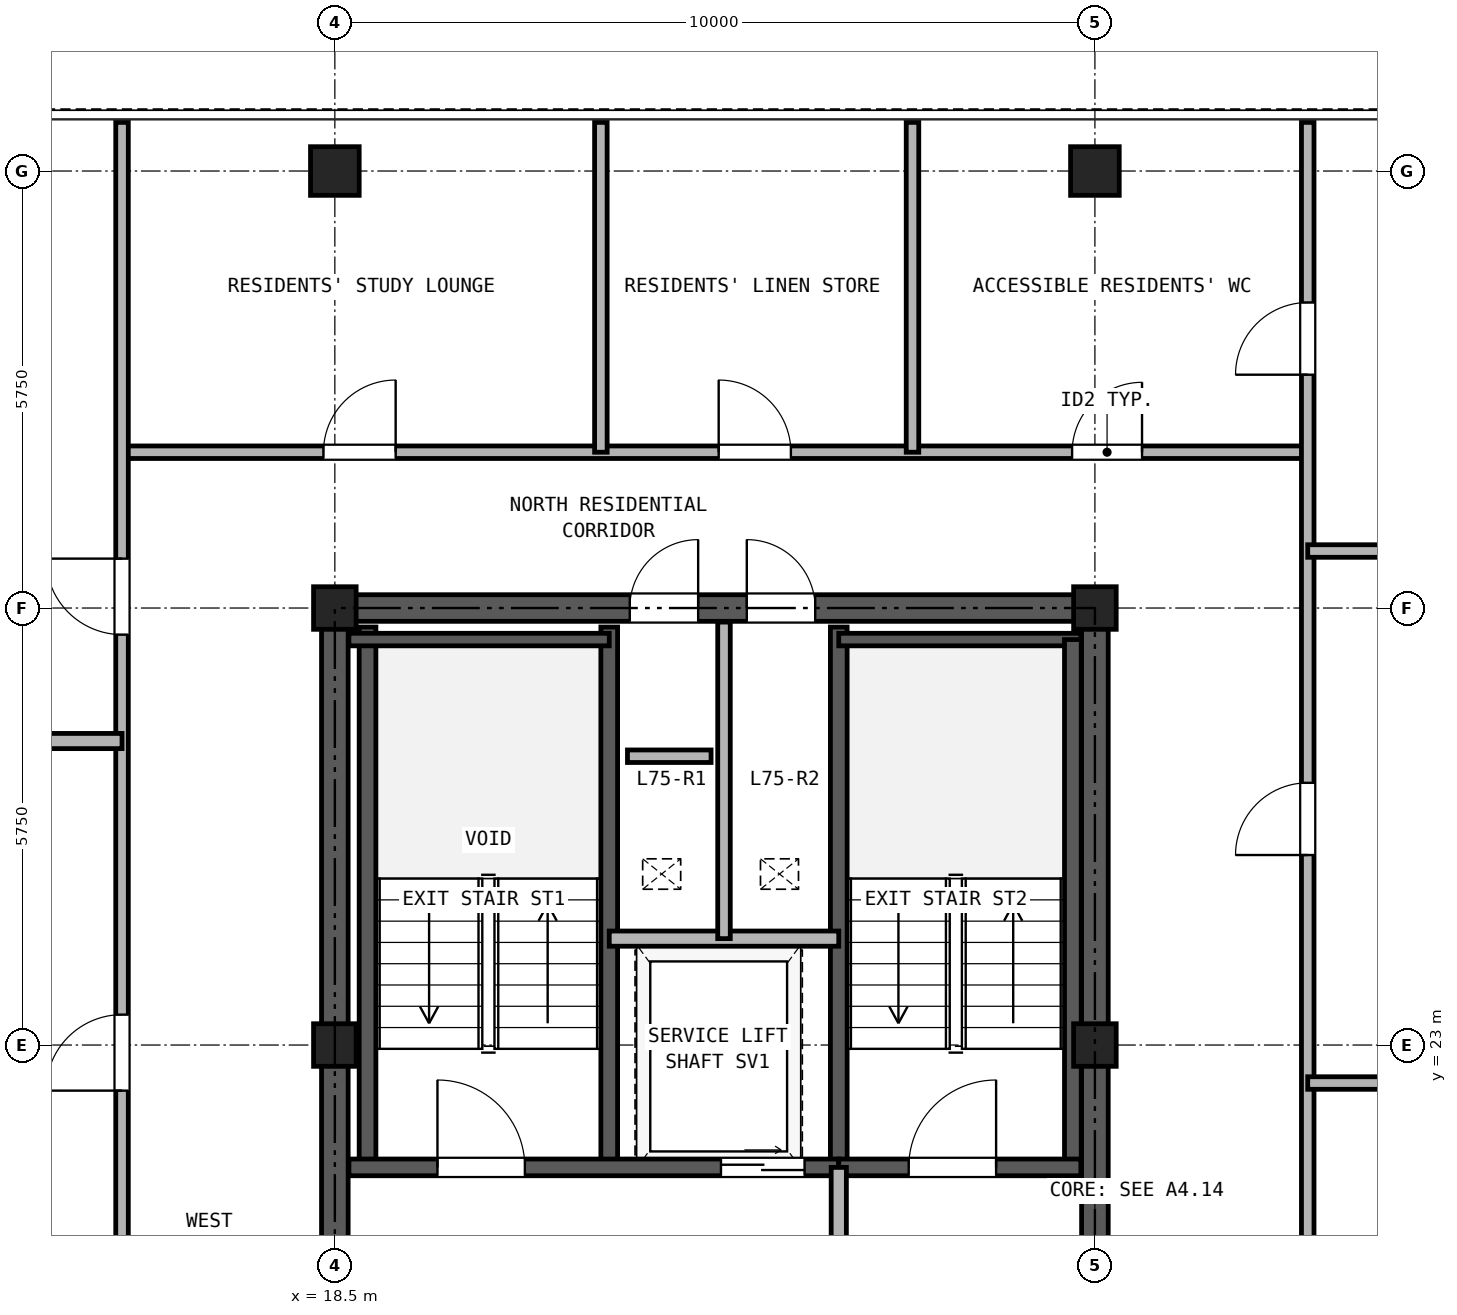
"""IFC4 building model, lengths in metres.
Left out: names, types, materials, properties, quantities, classifications, styles, units other than length and angle.
Written with IfcOpenShell. Run it as: python <this file> out.ifc"""

import sys

from ifc_helpers import new_model, si_unit, direction, frame, frame_2d, origin, origin_2d, place, context, subcontext, project, spatial, rectangle, hollow_rectangle, extrude, source, transform, mapped, element, fill, save


model = new_model("IFC4")
c1 = context("Model", 3, precision=1e-05, world=origin(), true_north=direction((0.0, 1.0)))
c2 = subcontext(c1, "Body", "Model", "MODEL_VIEW")
j1 = project(units=[si_unit("LENGTHUNIT", "METRE"), si_unit("PLANEANGLEUNIT", "RADIAN")], contexts=[c1])
p1 = place(None, origin())
s1 = spatial("IfcSite", under=j1, at=p1, CompositionType="ELEMENT")
p2 = place(p1, origin())
s2 = spatial("IfcBuilding", under=s1, at=p2, CompositionType="ELEMENT")
p3 = place(p2, frame((0.0, 0.0, 261.7)))
s3 = spatial("IfcBuildingStorey", under=s2, at=p3, CompositionType="ELEMENT", Elevation=261.7)
m1 = source(origin(), c2, "Body", "SweptSolid", [
    extrude(hollow_rectangle(XDim=0.64, YDim=0.64, WallThickness=0.035, at=origin_2d()), origin(), (0.0, 0.0, 1.0), 2.98),
])
for number, where, z_axis, x_axis in (
    (1, (18.5, 34.5, 0.0), (0.0, 0.0, 1.0), (1.0, 0.0, 0.0)),
    (2, (28.5, 34.5, 0.0), (0.0, 0.0, 1.0), (1.0, 0.0, 0.0)),
):
    element("IfcColumn", number, at=place(p3, frame(where, z_axis=z_axis, x_axis=x_axis)), inside=s3, PredefinedType="COLUMN", context=c2, shape_type="MappedRepresentation", body=[
        mapped(m1, transform((0.0, 0.0, 0.0), x_axis=(1.0, 0.0, 0.0), y_axis=(0.0, 1.0, 0.0), z_axis=(0.0, 0.0, 1.0), scale=1.0)),
    ])
m2 = source(origin(), c2, "Body", "SweptSolid", [
    extrude(hollow_rectangle(XDim=0.56, YDim=0.56, WallThickness=0.03, at=origin_2d()), origin(), (0.0, 0.0, 1.0), 2.98),
])
for number, where, z_axis, x_axis in (
    (3, (18.5, 23.0, 0.0), (0.0, 0.0, 1.0), (1.0, 0.0, 0.0)),
    (4, (18.5, 28.75, 0.0), (0.0, 0.0, 1.0), (1.0, 0.0, 0.0)),
    (5, (28.5, 23.0, 0.0), (0.0, 0.0, 1.0), (1.0, 0.0, 0.0)),
    (6, (28.5, 28.75, 0.0), (0.0, 0.0, 1.0), (1.0, 0.0, 0.0)),
):
    element("IfcColumn", number, at=place(p3, frame(where, z_axis=z_axis, x_axis=x_axis)), inside=s3, PredefinedType="COLUMN", context=c2, shape_type="MappedRepresentation", body=[
        mapped(m2, transform((0.0, 0.0, 0.0), x_axis=(1.0, 0.0, 0.0), y_axis=(0.0, 1.0, 0.0), z_axis=(0.0, 0.0, 1.0), scale=1.0)),
    ])
p4 = place(p3, frame((18.325, 28.75, 0.0), z_axis=(0.0, 0.0, 1.0), x_axis=(1.0, 0.0, 0.0)))
e7 = element("IfcWall", 7, at=p4, inside=s3, PredefinedType="SHEAR", context=c2, shape_type="SweptSolid", body=[
    extrude(rectangle(XDim=10.35, YDim=0.35, at=frame_2d((5.175, 0.0))), origin(), (0.0, 0.0, 1.0), 2.98),
])
p5 = place(p4, frame((4.055, 0.0, 0.0)))
e8 = element("IfcOpeningElement", 8, at=p5, cuts=e7, PredefinedType="OPENING", context=c2, shape_type="SweptSolid", body=[
    extrude(rectangle(XDim=0.9, YDim=2.05, at=frame_2d((0.45, 1.025))), frame((0.0, 0.185, 0.0), z_axis=(0.0, -1.0, 0.0), x_axis=(1.0, 0.0, 0.0)), (0.0, 0.0, 1.0), 0.37),
])
p6 = place(p4, frame((5.595, 0.0, 0.0)))
e9 = element("IfcOpeningElement", 9, at=p6, cuts=e7, PredefinedType="OPENING", context=c2, shape_type="SweptSolid", body=[
    extrude(rectangle(XDim=0.9, YDim=2.05, at=frame_2d((0.45, 1.025))), frame((0.0, 0.185, 0.0), z_axis=(0.0, -1.0, 0.0), x_axis=(1.0, 0.0, 0.0)), (0.0, 0.0, 1.0), 0.37),
])
p7 = place(p3, frame((18.5, 11.675, 0.0), z_axis=(0.0, 0.0, 1.0), x_axis=(0.0, 1.0, 0.0)))
e10 = element("IfcWall", 10, at=p7, inside=s3, PredefinedType="SHEAR", context=c2, shape_type="SweptSolid", body=[
    extrude(rectangle(XDim=16.9, YDim=0.35, at=frame_2d((8.45, 0.0))), origin(), (0.0, 0.0, 1.0), 2.98),
])
p8 = place(p7, frame((7.475, 0.0, 0.0)))
e11 = element("IfcOpeningElement", 11, at=p8, cuts=e10, PredefinedType="OPENING", context=c2, shape_type="SweptSolid", body=[
    extrude(rectangle(XDim=1.15, YDim=2.2, at=frame_2d((0.575, 1.1))), frame((0.0, 0.185, 0.0), z_axis=(0.0, -1.0, 0.0), x_axis=(1.0, 0.0, 0.0)), (0.0, 0.0, 1.0), 0.37),
])
p9 = place(p3, frame((28.5, 11.675, 0.0), z_axis=(0.0, 0.0, 1.0), x_axis=(0.0, 1.0, 0.0)))
e12 = element("IfcWall", 12, at=p9, inside=s3, PredefinedType="SHEAR", context=c2, shape_type="SweptSolid", body=[
    extrude(rectangle(XDim=16.9, YDim=0.35, at=frame_2d((8.45, 0.0))), origin(), (0.0, 0.0, 1.0), 2.98),
])
p10 = place(p9, frame((7.475, 0.0, 0.0)))
e13 = element("IfcOpeningElement", 13, at=p10, cuts=e12, PredefinedType="OPENING", context=c2, shape_type="SweptSolid", body=[
    extrude(rectangle(XDim=1.15, YDim=2.2, at=frame_2d((0.575, 1.1))), frame((0.0, 0.185, 0.0), z_axis=(0.0, -1.0, 0.0), x_axis=(1.0, 0.0, 0.0)), (0.0, 0.0, 1.0), 0.37),
])
for number, where, z_axis, x_axis in (
    (14, (18.93, 21.39, 0.0), (0.0, 0.0, 1.0), (0.0, 1.0, 0.0)),
    (15, (22.11, 21.39, 0.0), (0.0, 0.0, 1.0), (0.0, 1.0, 0.0)),
    (16, (25.13, 21.39, 0.0), (0.0, 0.0, 1.0), (0.0, 1.0, 0.0)),
):
    element("IfcWall", number, at=place(p3, frame(where, z_axis=z_axis, x_axis=x_axis)), inside=s3, PredefinedType="SOLIDWALL", context=c2, shape_type="SweptSolid", body=[
        extrude(rectangle(XDim=7.11, YDim=0.22, at=frame_2d((3.555, 0.0))), origin(), (0.0, 0.0, 1.0), 2.98),
    ])
p11 = place(p3, frame((18.685, 28.335, 0.0), z_axis=(0.0, 0.0, 1.0), x_axis=(1.0, 0.0, 0.0)))
e17 = element("IfcWall", 17, at=p11, inside=s3, PredefinedType="PARTITIONING", context=c2, shape_type="SweptSolid", body=[
    extrude(rectangle(XDim=3.425, YDim=0.165, at=frame_2d((1.712, 0.0))), origin(), (0.0, 0.0, 1.0), 2.98),
])
p12 = place(p3, frame((25.13, 28.335, 0.0), z_axis=(0.0, 0.0, 1.0), x_axis=(1.0, 0.0, 0.0)))
e18 = element("IfcWall", 18, at=p12, inside=s3, PredefinedType="PARTITIONING", context=c2, shape_type="SweptSolid", body=[
    extrude(rectangle(XDim=3.185, YDim=0.165, at=frame_2d((1.593, 0.0))), origin(), (0.0, 0.0, 1.0), 2.98),
])
p13 = place(p3, frame((28.21, 21.39, 0.0), z_axis=(0.0, 0.0, 1.0), x_axis=(0.0, 1.0, 0.0)))
e19 = element("IfcWall", 19, at=p13, inside=s3, PredefinedType="SOLIDWALL", context=c2, shape_type="SweptSolid", body=[
    extrude(rectangle(XDim=6.945, YDim=0.22, at=frame_2d((3.473, 0.0))), origin(), (0.0, 0.0, 1.0), 2.98),
])
p14 = place(p3, frame((18.685, 21.39, 0.0), z_axis=(0.0, 0.0, 1.0), x_axis=(1.0, 0.0, 0.0)))
e20 = element("IfcWall", 20, at=p14, inside=s3, PredefinedType="SOLIDWALL", context=c2, shape_type="SweptSolid", body=[
    extrude(rectangle(XDim=6.445, YDim=0.22, at=frame_2d((3.222, 0.0))), origin(), (0.0, 0.0, 1.0), 2.98),
])
p15 = place(p14, frame((1.165, 0.0, 0.0)))
e21 = element("IfcOpeningElement", 21, at=p15, cuts=e20, PredefinedType="OPENING", context=c2, shape_type="SweptSolid", body=[
    extrude(rectangle(XDim=1.15, YDim=2.2, at=frame_2d((0.575, 1.1))), frame((0.0, 0.12, 0.0), z_axis=(0.0, -1.0, 0.0), x_axis=(1.0, 0.0, 0.0)), (0.0, 0.0, 1.0), 0.24),
])
p16 = place(p14, frame((4.895, 0.0, 0.0)))
e22 = element("IfcOpeningElement", 22, at=p16, cuts=e20, PredefinedType="OPENING", context=c2, shape_type="SweptSolid", body=[
    extrude(rectangle(XDim=1.1, YDim=2.25, at=frame_2d((0.55, 1.125))), frame((0.0, 0.12, 0.0), z_axis=(0.0, -1.0, 0.0), x_axis=(1.0, 0.0, 0.0)), (0.0, 0.0, 1.0), 0.24),
])
p17 = place(p3, frame((25.13, 21.39, 0.0), z_axis=(0.0, 0.0, 1.0), x_axis=(1.0, 0.0, 0.0)))
e23 = element("IfcWall", 23, at=p17, inside=s3, PredefinedType="SOLIDWALL", context=c2, shape_type="SweptSolid", body=[
    extrude(rectangle(XDim=3.185, YDim=0.22, at=frame_2d((1.593, 0.0))), origin(), (0.0, 0.0, 1.0), 2.98),
])
p18 = place(p17, frame((0.92, 0.0, 0.0)))
e24 = element("IfcOpeningElement", 24, at=p18, cuts=e23, PredefinedType="OPENING", context=c2, shape_type="SweptSolid", body=[
    extrude(rectangle(XDim=1.15, YDim=2.2, at=frame_2d((0.575, 1.1))), frame((0.0, 0.12, 0.0), z_axis=(0.0, -1.0, 0.0), x_axis=(1.0, 0.0, 0.0)), (0.0, 0.0, 1.0), 0.24),
])
p19 = place(p3, frame((22.11, 24.4, 0.0), z_axis=(0.0, 0.0, 1.0), x_axis=(1.0, 0.0, 0.0)))
e25 = element("IfcWall", 25, at=p19, inside=s3, PredefinedType="PARTITIONING", context=c2, shape_type="SweptSolid", body=[
    extrude(rectangle(XDim=3.02, YDim=0.2, at=frame_2d((1.51, 0.0))), origin(), (0.0, 0.0, 1.0), 2.98),
])
p20 = place(p3, frame((23.62, 24.4, 0.0), z_axis=(0.0, 0.0, 1.0), x_axis=(0.0, 1.0, 0.0)))
e26 = element("IfcWall", 26, at=p20, inside=s3, PredefinedType="PARTITIONING", context=c2, shape_type="SweptSolid", body=[
    extrude(rectangle(XDim=4.165, YDim=0.165, at=frame_2d((2.083, 0.0))), origin(), (0.0, 0.0, 1.0), 2.98),
])
p21 = place(p3, frame((25.13, 18.0, 0.0), z_axis=(0.0, 0.0, 1.0), x_axis=(0.0, 1.0, 0.0)))
e27 = element("IfcWall", 27, at=p21, inside=s3, PredefinedType="PARTITIONING", context=c2, shape_type="SweptSolid", body=[
    extrude(rectangle(XDim=3.39, YDim=0.2, at=frame_2d((1.695, 0.0))), origin(), (0.0, 0.0, 1.0), 2.98),
])
p22 = place(p21, frame((1.1, 0.0, 0.0)))
e28 = element("IfcOpeningElement", 28, at=p22, cuts=e27, PredefinedType="OPENING", context=c2, shape_type="SweptSolid", body=[
    extrude(rectangle(XDim=1.15, YDim=2.2, at=frame_2d((0.575, 1.1))), frame((0.0, 0.11, 0.0), z_axis=(0.0, -1.0, 0.0), x_axis=(1.0, 0.0, 0.0)), (0.0, 0.0, 1.0), 0.22),
])
p23 = place(p3, frame((15.7, 30.8, 0.0), z_axis=(0.0, 0.0, 1.0), x_axis=(1.0, 0.0, 0.0)))
e29 = element("IfcWall", 29, at=p23, inside=s3, PredefinedType="PARTITIONING", context=c2, shape_type="SweptSolid", body=[
    extrude(rectangle(XDim=15.6, YDim=0.165, at=frame_2d((7.8, 0.0))), origin(), (0.0, 0.0, 1.0), 2.98),
])
p24 = place(p23, frame((2.65, 0.0, 0.0)))
e30 = element("IfcOpeningElement", 30, at=p24, cuts=e29, PredefinedType="OPENING", context=c2, shape_type="SweptSolid", body=[
    extrude(rectangle(XDim=0.95, YDim=2.15, at=frame_2d((0.475, 1.075))), frame((0.0, 0.093, 0.0), z_axis=(0.0, -1.0, 0.0), x_axis=(1.0, 0.0, 0.0)), (0.0, 0.0, 1.0), 0.185),
])
p25 = place(p23, frame((7.85, 0.0, 0.0)))
e31 = element("IfcOpeningElement", 31, at=p25, cuts=e29, PredefinedType="OPENING", context=c2, shape_type="SweptSolid", body=[
    extrude(rectangle(XDim=0.95, YDim=2.15, at=frame_2d((0.475, 1.075))), frame((0.0, 0.093, 0.0), z_axis=(0.0, -1.0, 0.0), x_axis=(1.0, 0.0, 0.0)), (0.0, 0.0, 1.0), 0.185),
])
p26 = place(p23, frame((12.5, 0.0, 0.0)))
e32 = element("IfcOpeningElement", 32, at=p26, cuts=e29, PredefinedType="OPENING", context=c2, shape_type="SweptSolid", body=[
    extrude(rectangle(XDim=0.92, YDim=2.1, at=frame_2d((0.46, 1.05))), frame((0.0, 0.093, 0.0), z_axis=(0.0, -1.0, 0.0), x_axis=(1.0, 0.0, 0.0)), (0.0, 0.0, 1.0), 0.185),
])
p27 = place(p3, frame((15.7, 10.85, 0.0), z_axis=(0.0, 0.0, 1.0), x_axis=(0.0, 1.0, 0.0)))
e33 = element("IfcWall", 33, at=p27, inside=s3, PredefinedType="PARTITIONING", context=c2, shape_type="SweptSolid", body=[
    extrude(rectangle(XDim=24.29, YDim=0.165, at=frame_2d((12.145, 0.0))), origin(), (0.0, 0.0, 1.0), 2.98),
])
p28 = place(p27, frame((3.475, 0.0, 0.0)))
e34 = element("IfcOpeningElement", 34, at=p28, cuts=e33, PredefinedType="OPENING", context=c2, shape_type="SweptSolid", body=[
    extrude(rectangle(XDim=1.0, YDim=2.15, at=frame_2d((0.5, 1.075))), frame((0.0, 0.093, 0.0), z_axis=(0.0, -1.0, 0.0), x_axis=(1.0, 0.0, 0.0)), (0.0, 0.0, 1.0), 0.185),
])
p29 = place(p27, frame((11.55, 0.0, 0.0)))
e35 = element("IfcOpeningElement", 35, at=p29, cuts=e33, PredefinedType="OPENING", context=c2, shape_type="SweptSolid", body=[
    extrude(rectangle(XDim=1.0, YDim=2.15, at=frame_2d((0.5, 1.075))), frame((0.0, 0.093, 0.0), z_axis=(0.0, -1.0, 0.0), x_axis=(1.0, 0.0, 0.0)), (0.0, 0.0, 1.0), 0.185),
])
p30 = place(p27, frame((17.55, 0.0, 0.0)))
e36 = element("IfcOpeningElement", 36, at=p30, cuts=e33, PredefinedType="OPENING", context=c2, shape_type="SweptSolid", body=[
    extrude(rectangle(XDim=1.0, YDim=2.15, at=frame_2d((0.5, 1.075))), frame((0.0, 0.093, 0.0), z_axis=(0.0, -1.0, 0.0), x_axis=(1.0, 0.0, 0.0)), (0.0, 0.0, 1.0), 0.185),
])
p31 = place(p3, frame((31.3, 10.85, 0.0), z_axis=(0.0, 0.0, 1.0), x_axis=(0.0, 1.0, 0.0)))
e37 = element("IfcWall", 37, at=p31, inside=s3, PredefinedType="PARTITIONING", context=c2, shape_type="SweptSolid", body=[
    extrude(rectangle(XDim=24.29, YDim=0.165, at=frame_2d((12.145, 0.0))), origin(), (0.0, 0.0, 1.0), 2.98),
])
p32 = place(p31, frame((5.325, 0.0, 0.0)))
e38 = element("IfcOpeningElement", 38, at=p32, cuts=e37, PredefinedType="OPENING", context=c2, shape_type="SweptSolid", body=[
    extrude(rectangle(XDim=0.95, YDim=2.15, at=frame_2d((0.475, 1.075))), frame((0.0, 0.093, 0.0), z_axis=(0.0, -1.0, 0.0), x_axis=(1.0, 0.0, 0.0)), (0.0, 0.0, 1.0), 0.185),
])
p33 = place(p31, frame((14.65, 0.0, 0.0)))
e39 = element("IfcOpeningElement", 39, at=p33, cuts=e37, PredefinedType="OPENING", context=c2, shape_type="SweptSolid", body=[
    extrude(rectangle(XDim=0.95, YDim=2.15, at=frame_2d((0.475, 1.075))), frame((0.0, 0.093, 0.0), z_axis=(0.0, -1.0, 0.0), x_axis=(1.0, 0.0, 0.0)), (0.0, 0.0, 1.0), 0.185),
])
p34 = place(p31, frame((20.97, 0.0, 0.0)))
e40 = element("IfcOpeningElement", 40, at=p34, cuts=e37, PredefinedType="OPENING", context=c2, shape_type="SweptSolid", body=[
    extrude(rectangle(XDim=0.95, YDim=2.15, at=frame_2d((0.475, 1.075))), frame((0.0, 0.093, 0.0), z_axis=(0.0, -1.0, 0.0), x_axis=(1.0, 0.0, 0.0)), (0.0, 0.0, 1.0), 0.185),
])
p35 = place(p3, frame((5.36, 27.0, 0.0), z_axis=(0.0, 0.0, 1.0), x_axis=(1.0, 0.0, 0.0)))
e41 = element("IfcWall", 41, at=p35, inside=s3, PredefinedType="PARTITIONING", context=c2, shape_type="SweptSolid", body=[
    extrude(rectangle(XDim=10.34, YDim=0.2, at=frame_2d((5.17, 0.0))), origin(), (0.0, 0.0, 1.0), 2.98),
])
for number, where, z_axis, x_axis in (
    (42, (31.3, 22.5, 0.0), (0.0, 0.0, 1.0), (1.0, 0.0, 0.0)),
    (43, (31.3, 29.5, 0.0), (0.0, 0.0, 1.0), (1.0, 0.0, 0.0)),
):
    element("IfcWall", number, at=place(p3, frame(where, z_axis=z_axis, x_axis=x_axis)), inside=s3, PredefinedType="PARTITIONING", context=c2, shape_type="SweptSolid", body=[
        extrude(rectangle(XDim=10.34, YDim=0.165, at=frame_2d((5.17, 0.0))), origin(), (0.0, 0.0, 1.0), 2.98),
    ])
for number, where, z_axis, x_axis in (
    (44, (22.0, 30.8, 0.0), (0.0, 0.0, 1.0), (0.0, 1.0, 0.0)),
    (45, (26.1, 30.8, 0.0), (0.0, 0.0, 1.0), (0.0, 1.0, 0.0)),
):
    element("IfcWall", number, at=place(p3, frame(where, z_axis=z_axis, x_axis=x_axis)), inside=s3, PredefinedType="PARTITIONING", context=c2, shape_type="SweptSolid", body=[
        extrude(rectangle(XDim=4.34, YDim=0.165, at=frame_2d((2.17, 0.0))), origin(), (0.0, 0.0, 1.0), 2.98),
    ])
p36 = place(p3, frame((22.35, 26.8, 0.0), z_axis=(0.0, 0.0, 1.0), x_axis=(1.0, 0.0, 0.0)))
e46 = element("IfcWall", 46, at=p36, inside=s3, PredefinedType="PARTITIONING", context=c2, shape_type="SweptSolid", body=[
    extrude(rectangle(XDim=1.1, YDim=0.165, at=frame_2d((0.55, 0.0))), origin(), (0.0, 0.0, 1.0), 2.98),
])
p37 = place(p15, frame((1.15, 0.0, 0.0), z_axis=(0.0, 0.0, 1.0), x_axis=(-1.0, 0.0, 0.0)))
e47 = element("IfcDoor", 47, at=p37, inside=s3, OperationType="SINGLE_SWING_LEFT", PredefinedType="DOOR", context=c2, shape_type="SweptSolid", body=[
    extrude(rectangle(XDim=1.15, YDim=2.2, at=frame_2d((0.575, 1.1))), frame((0.0, 0.025, 0.0), z_axis=(0.0, -1.0, 0.0), x_axis=(1.0, 0.0, 0.0)), (0.0, 0.0, 1.0), 0.05),
])
fill(e21, e47)
p38 = place(p18, frame((1.15, 0.0, 0.0), z_axis=(0.0, 0.0, 1.0), x_axis=(-1.0, 0.0, 0.0)))
e48 = element("IfcDoor", 48, at=p38, inside=s3, OperationType="SINGLE_SWING_RIGHT", PredefinedType="DOOR", context=c2, shape_type="SweptSolid", body=[
    extrude(rectangle(XDim=1.15, YDim=2.2, at=frame_2d((0.575, 1.1))), frame((0.0, 0.025, 0.0), z_axis=(0.0, -1.0, 0.0), x_axis=(1.0, 0.0, 0.0)), (0.0, 0.0, 1.0), 0.05),
])
fill(e24, e48)
p39 = place(p16, frame((1.1, 0.0, 0.0), z_axis=(0.0, 0.0, 1.0), x_axis=(-1.0, 0.0, 0.0)))
e49 = element("IfcDoor", 49, at=p39, inside=s3, OperationType="DOUBLE_DOOR_SLIDING", PredefinedType="DOOR", context=c2, shape_type="SweptSolid", body=[
    extrude(rectangle(XDim=1.1, YDim=2.25, at=frame_2d((0.55, 1.125))), frame((0.0, 0.025, 0.0), z_axis=(0.0, -1.0, 0.0), x_axis=(1.0, 0.0, 0.0)), (0.0, 0.0, 1.0), 0.05),
])
fill(e22, e49)
p40 = place(p5, origin())
e50 = element("IfcDoor", 50, at=p40, inside=s3, OperationType="SINGLE_SWING_RIGHT", PredefinedType="DOOR", context=c2, shape_type="SweptSolid", body=[
    extrude(rectangle(XDim=0.9, YDim=2.05, at=frame_2d((0.45, 1.025))), frame((0.0, 0.025, 0.0), z_axis=(0.0, -1.0, 0.0), x_axis=(1.0, 0.0, 0.0)), (0.0, 0.0, 1.0), 0.05),
])
fill(e8, e50)
p41 = place(p6, origin())
e51 = element("IfcDoor", 51, at=p41, inside=s3, OperationType="SINGLE_SWING_LEFT", PredefinedType="DOOR", context=c2, shape_type="SweptSolid", body=[
    extrude(rectangle(XDim=0.9, YDim=2.05, at=frame_2d((0.45, 1.025))), frame((0.0, 0.025, 0.0), z_axis=(0.0, -1.0, 0.0), x_axis=(1.0, 0.0, 0.0)), (0.0, 0.0, 1.0), 0.05),
])
fill(e9, e51)
p42 = place(p29, origin())
e52 = element("IfcDoor", 52, at=p42, inside=s3, OperationType="SINGLE_SWING_LEFT", PredefinedType="DOOR", context=c2, shape_type="SweptSolid", body=[
    extrude(rectangle(XDim=1.0, YDim=2.15, at=frame_2d((0.5, 1.075))), frame((0.0, 0.025, 0.0), z_axis=(0.0, -1.0, 0.0), x_axis=(1.0, 0.0, 0.0)), (0.0, 0.0, 1.0), 0.05),
])
fill(e35, e52)
p43 = place(p30, origin())
e53 = element("IfcDoor", 53, at=p43, inside=s3, OperationType="SINGLE_SWING_RIGHT", PredefinedType="DOOR", context=c2, shape_type="SweptSolid", body=[
    extrude(rectangle(XDim=1.0, YDim=2.15, at=frame_2d((0.5, 1.075))), frame((0.0, 0.025, 0.0), z_axis=(0.0, -1.0, 0.0), x_axis=(1.0, 0.0, 0.0)), (0.0, 0.0, 1.0), 0.05),
])
fill(e36, e53)
p44 = place(p33, origin())
e54 = element("IfcDoor", 54, at=p44, inside=s3, OperationType="SINGLE_SWING_LEFT", PredefinedType="DOOR", context=c2, shape_type="SweptSolid", body=[
    extrude(rectangle(XDim=0.95, YDim=2.15, at=frame_2d((0.475, 1.075))), frame((0.0, 0.025, 0.0), z_axis=(0.0, -1.0, 0.0), x_axis=(1.0, 0.0, 0.0)), (0.0, 0.0, 1.0), 0.05),
])
fill(e39, e54)
p45 = place(p34, origin())
e55 = element("IfcDoor", 55, at=p45, inside=s3, OperationType="SINGLE_SWING_LEFT", PredefinedType="DOOR", context=c2, shape_type="SweptSolid", body=[
    extrude(rectangle(XDim=0.95, YDim=2.15, at=frame_2d((0.475, 1.075))), frame((0.0, 0.025, 0.0), z_axis=(0.0, -1.0, 0.0), x_axis=(1.0, 0.0, 0.0)), (0.0, 0.0, 1.0), 0.05),
])
fill(e40, e55)
p46 = place(p24, origin())
e56 = element("IfcDoor", 56, at=p46, inside=s3, OperationType="SINGLE_SWING_RIGHT", PredefinedType="DOOR", context=c2, shape_type="SweptSolid", body=[
    extrude(rectangle(XDim=0.95, YDim=2.15, at=frame_2d((0.475, 1.075))), frame((0.0, 0.025, 0.0), z_axis=(0.0, -1.0, 0.0), x_axis=(1.0, 0.0, 0.0)), (0.0, 0.0, 1.0), 0.05),
])
fill(e30, e56)
p47 = place(p25, origin())
e57 = element("IfcDoor", 57, at=p47, inside=s3, OperationType="SINGLE_SWING_LEFT", PredefinedType="DOOR", context=c2, shape_type="SweptSolid", body=[
    extrude(rectangle(XDim=0.95, YDim=2.15, at=frame_2d((0.475, 1.075))), frame((0.0, 0.025, 0.0), z_axis=(0.0, -1.0, 0.0), x_axis=(1.0, 0.0, 0.0)), (0.0, 0.0, 1.0), 0.05),
])
fill(e31, e57)
p48 = place(p26, origin())
e58 = element("IfcDoor", 58, at=p48, inside=s3, OperationType="SINGLE_SWING_RIGHT", PredefinedType="DOOR", context=c2, shape_type="SweptSolid", body=[
    extrude(rectangle(XDim=0.92, YDim=2.1, at=frame_2d((0.46, 1.05))), frame((0.0, 0.025, 0.0), z_axis=(0.0, -1.0, 0.0), x_axis=(1.0, 0.0, 0.0)), (0.0, 0.0, 1.0), 0.05),
])
fill(e32, e58)
save(model, sys.argv[1])
